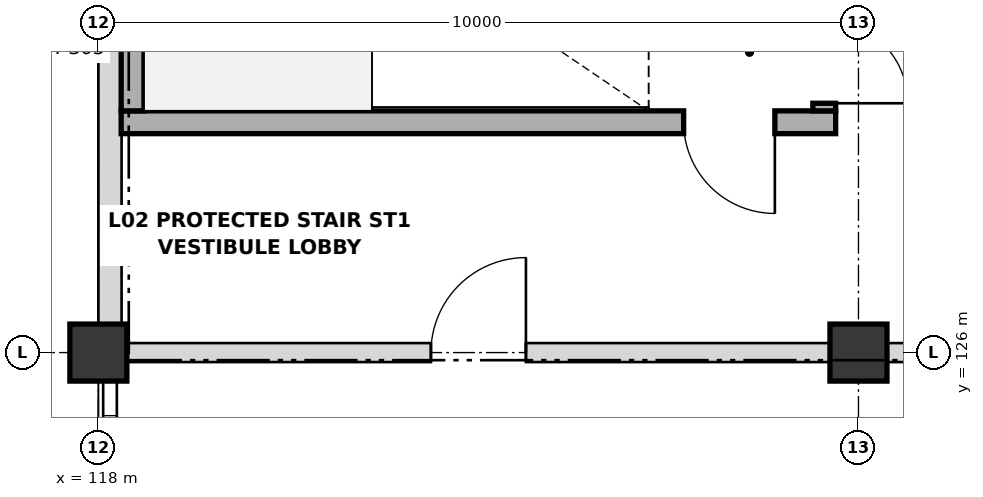
"""IFC4 building model, lengths in metres.
Left out: names, types, materials, properties, quantities, classifications, styles, units other than length and angle.
Written with IfcOpenShell. Run it as: python <this file> out.ifc"""

import sys

from ifc_helpers import new_model, si_unit, direction, frame, frame_2d, origin, origin_2d, place, context, subcontext, project, spatial, rectangle, extrude, element, fill, save


model = new_model("IFC4")
c1 = context("Model", 3, precision=1e-05, world=origin(), true_north=direction((0.0, 1.0)))
c2 = subcontext(c1, "Body", "Model", "MODEL_VIEW")
j1 = project(units=[si_unit("LENGTHUNIT", "METRE"), si_unit("PLANEANGLEUNIT", "RADIAN")], contexts=[c1])
p1 = place(None, origin())
s1 = spatial("IfcSite", under=j1, at=p1, CompositionType="ELEMENT")
p2 = place(p1, origin())
s2 = spatial("IfcBuilding", under=s1, at=p2, CompositionType="ELEMENT")
p3 = place(p2, frame((0.0, 0.0, 9.6)))
s3 = spatial("IfcBuildingStorey", under=s2, at=p3, CompositionType="ELEMENT", Elevation=9.6)
for number, where, z_axis, x_axis in (
    (1, (118.0, 126.0, 0.0), (0.0, 0.0, 1.0), (1.0, 0.0, 0.0)),
    (2, (128.0, 126.0, 0.0), (0.0, 0.0, 1.0), (1.0, 0.0, 0.0)),
):
    element("IfcColumn", number, at=place(p3, frame(where, z_axis=z_axis, x_axis=x_axis)), inside=s3, PredefinedType="COLUMN", context=c2, shape_type="SweptSolid", body=[
        extrude(rectangle(XDim=0.75, YDim=0.75, at=origin_2d()), origin(), (0.0, 0.0, 1.0), 4.8),
    ])
p4 = place(p3, frame((118.153, 126.37, 0.0), z_axis=(0.0, 0.0, 1.0), x_axis=(0.0, 1.0, 0.0)))
e3 = element("IfcWall", 3, at=p4, inside=s3, PredefinedType="SOLIDWALL", context=c2, shape_type="SweptSolid", body=[
    extrude(rectangle(XDim=7.26, YDim=0.305, at=frame_2d((3.63, 0.0))), origin(), (0.0, 0.0, 1.0), 3.658),
])
p5 = place(p3, frame((127.7, 129.03, 0.0), z_axis=(0.0, 0.0, 1.0), x_axis=(-1.0, 0.0, 0.0)))
e4 = element("IfcWall", 4, at=p5, inside=s3, PredefinedType="SHEAR", context=c2, shape_type="SweptSolid", body=[
    extrude(rectangle(XDim=9.4, YDim=0.3, at=frame_2d((4.7, 0.0))), origin(), (0.0, 0.0, 1.0), 4.8),
])
p6 = place(p5, frame((0.8, 0.0, 0.0)))
e5 = element("IfcOpeningElement", 5, at=p6, cuts=e4, PredefinedType="OPENING", context=c2, shape_type="SweptSolid", body=[
    extrude(rectangle(XDim=1.2, YDim=2.15, at=frame_2d((0.6, 1.075))), frame((0.0, 0.16, 0.0), z_axis=(0.0, -1.0, 0.0), x_axis=(1.0, 0.0, 0.0)), (0.0, 0.0, 1.0), 0.32),
])
p7 = place(p3, frame((127.55, 133.68, 0.0), z_axis=(0.0, 0.0, 1.0), x_axis=(0.0, -1.0, 0.0)))
e6 = element("IfcWall", 6, at=p7, inside=s3, PredefinedType="SHEAR", context=c2, shape_type="SweptSolid", body=[
    extrude(rectangle(XDim=4.5, YDim=0.3, at=frame_2d((2.25, 0.0))), origin(), (0.0, 0.0, 1.0), 4.8),
])
p8 = place(p7, frame((3.3, 0.0, 0.0)))
e7 = element("IfcOpeningElement", 7, at=p8, cuts=e6, PredefinedType="OPENING", context=c2, shape_type="SweptSolid", body=[
    extrude(rectangle(XDim=1.1, YDim=2.15, at=frame_2d((0.55, 1.075))), frame((0.0, 0.16, 0.0), z_axis=(0.0, -1.0, 0.0), x_axis=(1.0, 0.0, 0.0)), (0.0, 0.0, 1.0), 0.32),
])
p9 = place(p3, frame((118.45, 129.18, 0.0), z_axis=(0.0, 0.0, 1.0), x_axis=(0.0, 1.0, 0.0)))
e8 = element("IfcWall", 8, at=p9, inside=s3, PredefinedType="SHEAR", context=c2, shape_type="SweptSolid", body=[
    extrude(rectangle(XDim=4.5, YDim=0.3, at=frame_2d((2.25, 0.0))), origin(), (0.0, 0.0, 1.0), 4.8),
])
p10 = place(p3, frame((118.38, 126.0, 0.0), z_axis=(0.0, 0.0, 1.0), x_axis=(1.0, 0.0, 0.0)))
e9 = element("IfcWall", 9, at=p10, inside=s3, PredefinedType="PARTITIONING", context=c2, shape_type="SweptSolid", body=[
    extrude(rectangle(XDim=9.24, YDim=0.25, at=frame_2d((4.62, 0.0))), origin(), (0.0, 0.0, 1.0), 3.658),
])
p11 = place(p10, frame((3.995, 0.0, 0.0)))
e10 = element("IfcOpeningElement", 10, at=p11, cuts=e9, PredefinedType="OPENING", context=c2, shape_type="SweptSolid", body=[
    extrude(rectangle(XDim=1.25, YDim=2.15, at=frame_2d((0.625, 1.075))), frame((0.0, 0.135, 0.0), z_axis=(0.0, -1.0, 0.0), x_axis=(1.0, 0.0, 0.0)), (0.0, 0.0, 1.0), 0.27),
])
p12 = place(p3, frame((128.38, 126.0, 0.0), z_axis=(0.0, 0.0, 1.0), x_axis=(1.0, 0.0, 0.0)))
e11 = element("IfcWall", 11, at=p12, inside=s3, PredefinedType="PARTITIONING", context=c2, shape_type="SweptSolid", body=[
    extrude(rectangle(XDim=9.24, YDim=0.25, at=frame_2d((4.62, 0.0))), origin(), (0.0, 0.0, 1.0), 3.658),
])
p13 = place(p12, frame((1.795, 0.0, 0.0)))
e12 = element("IfcOpeningElement", 12, at=p13, cuts=e11, PredefinedType="OPENING", context=c2, shape_type="SweptSolid", body=[
    extrude(rectangle(XDim=1.25, YDim=2.15, at=frame_2d((0.625, 1.075))), frame((0.0, 0.135, 0.0), z_axis=(0.0, -1.0, 0.0), x_axis=(1.0, 0.0, 0.0)), (0.0, 0.0, 1.0), 0.27),
])
p14 = place(p12, frame((6.27, 0.0, 0.0)))
e13 = element("IfcOpeningElement", 13, at=p14, cuts=e11, PredefinedType="OPENING", context=c2, shape_type="SweptSolid", body=[
    extrude(rectangle(XDim=1.1, YDim=2.15, at=frame_2d((0.55, 1.075))), frame((0.0, 0.135, 0.0), z_axis=(0.0, -1.0, 0.0), x_axis=(1.0, 0.0, 0.0)), (0.0, 0.0, 1.0), 0.27),
])
p15 = place(p6, origin())
e14 = element("IfcDoor", 14, at=p15, inside=s3, OperationType="SINGLE_SWING_LEFT", PredefinedType="DOOR", context=c2, shape_type="SweptSolid", body=[
    extrude(rectangle(XDim=1.2, YDim=2.15, at=frame_2d((0.6, 1.075))), frame((0.0, 0.025, 0.0), z_axis=(0.0, -1.0, 0.0), x_axis=(1.0, 0.0, 0.0)), (0.0, 0.0, 1.0), 0.05),
])
fill(e5, e14)
p16 = place(p8, origin())
e15 = element("IfcDoor", 15, at=p16, inside=s3, OperationType="SINGLE_SWING_RIGHT", PredefinedType="DOOR", context=c2, shape_type="SweptSolid", body=[
    extrude(rectangle(XDim=1.1, YDim=2.15, at=frame_2d((0.55, 1.075))), frame((0.0, 0.025, 0.0), z_axis=(0.0, -1.0, 0.0), x_axis=(1.0, 0.0, 0.0)), (0.0, 0.0, 1.0), 0.05),
])
fill(e7, e15)
p17 = place(p11, origin())
e16 = element("IfcDoor", 16, at=p17, inside=s3, OperationType="SINGLE_SWING_RIGHT", PredefinedType="DOOR", context=c2, shape_type="SweptSolid", body=[
    extrude(rectangle(XDim=1.25, YDim=2.15, at=frame_2d((0.625, 1.075))), frame((0.0, 0.025, 0.0), z_axis=(0.0, -1.0, 0.0), x_axis=(1.0, 0.0, 0.0)), (0.0, 0.0, 1.0), 0.05),
])
fill(e10, e16)
save(model, sys.argv[1])
